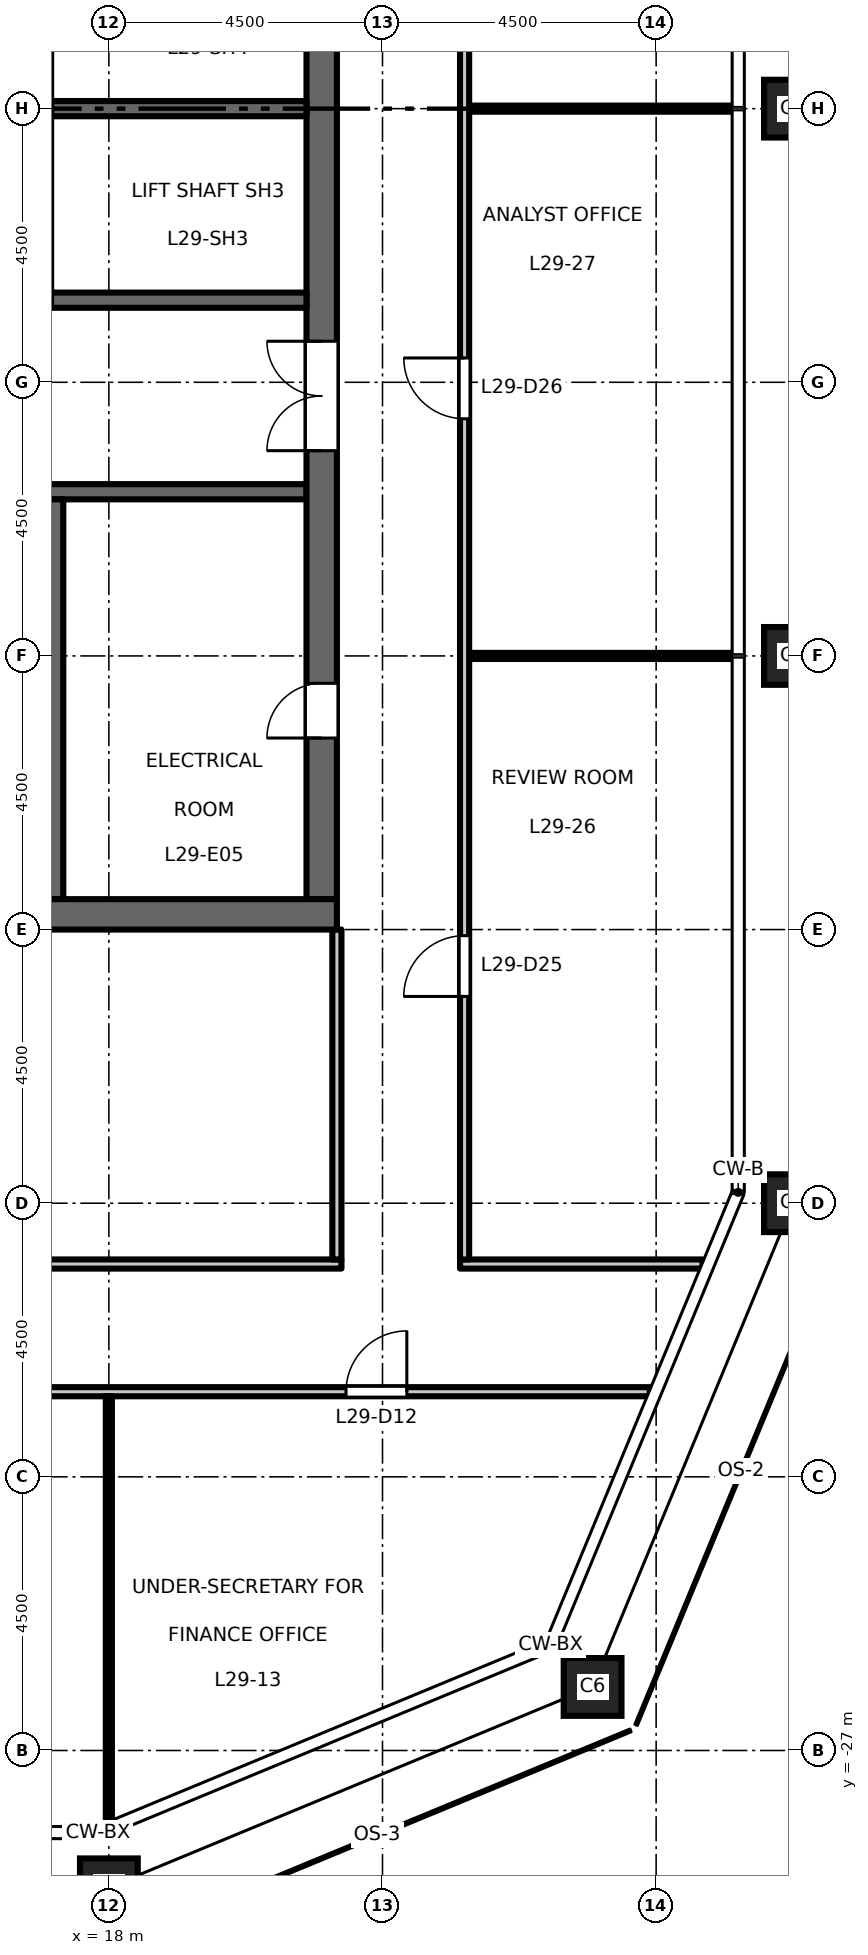
"""IFC4 building model, lengths in metres.
Left out: names, types, materials, properties, quantities, classifications, styles, units other than length and angle.
Written with IfcOpenShell. Run it as: python <this file> out.ifc"""

import sys

from ifc_helpers import new_model, si_unit, direction, frame, frame_2d, origin, origin_2d, place, context, subcontext, project, spatial, rectangle, hollow_rectangle, extrude, element, fill, save


model = new_model("IFC4")
c1 = context("Model", 3, precision=1e-05, world=origin(), true_north=direction((0.0, 1.0)))
c2 = subcontext(c1, "Body", "Model", "MODEL_VIEW")
j1 = project(units=[si_unit("LENGTHUNIT", "METRE"), si_unit("PLANEANGLEUNIT", "RADIAN")], contexts=[c1])
p1 = place(None, origin())
s1 = spatial("IfcSite", under=j1, at=p1, CompositionType="ELEMENT")
p2 = place(p1, origin())
s2 = spatial("IfcBuilding", under=s1, at=p2, CompositionType="ELEMENT")
p3 = place(p2, frame((0.0, 0.0, 136.2)))
s3 = spatial("IfcBuildingStorey", under=s2, at=p3, CompositionType="ELEMENT", Elevation=136.2)
for number, where, z_axis, x_axis in (
    (1, (18.0, -29.25, 0.0), (0.0, 0.0, 1.0), (1.0, 0.0, 0.0)),
    (2, (25.955, -25.955, 0.0), (0.0, 0.0, 1.0), (1.0, 0.0, 0.0)),
    (3, (29.25, -18.0, 0.0), (0.0, 0.0, 1.0), (1.0, 0.0, 0.0)),
    (4, (29.25, -9.0, 0.0), (0.0, 0.0, 1.0), (1.0, 0.0, 0.0)),
    (5, (29.25, 0.0, 0.0), (0.0, 0.0, 1.0), (1.0, 0.0, 0.0)),
):
    element("IfcColumn", number, at=place(p3, frame(where, z_axis=z_axis, x_axis=x_axis)), inside=s3, PredefinedType="COLUMN", context=c2, shape_type="SweptSolid", body=[
        extrude(hollow_rectangle(XDim=0.95, YDim=0.95, WallThickness=0.055, at=origin_2d()), origin(), (0.0, 0.0, 1.0), 4.5),
    ])
p4 = place(p3, frame((12.15, -6.3, 0.0), z_axis=(0.0, 0.0, 1.0), x_axis=(1.0, 0.0, 0.0)))
e6 = element("IfcWall", 6, at=p4, inside=s3, PredefinedType="SHEAR", context=c2, shape_type="SweptSolid", body=[
    extrude(rectangle(XDim=9.1, YDim=0.25, at=frame_2d((4.55, 0.0))), origin(), (0.0, 0.0, 1.0), 4.35),
])
p5 = place(p4, frame((1.8, 0.0, 0.0)))
e7 = element("IfcOpeningElement", 7, at=p5, cuts=e6, PredefinedType="OPENING", context=c2, shape_type="SweptSolid", body=[
    extrude(rectangle(XDim=1.0, YDim=2.1, at=frame_2d((0.5, 1.05))), frame((0.0, 0.135, 0.0), z_axis=(0.0, -1.0, 0.0), x_axis=(1.0, 0.0, 0.0)), (0.0, 0.0, 1.0), 0.27),
])
p6 = place(p3, frame((21.5, -13.0, 0.0), z_axis=(0.0, 0.0, 1.0), x_axis=(0.0, 1.0, 0.0)))
e8 = element("IfcWall", 8, at=p6, inside=s3, PredefinedType="SHEAR", context=c2, shape_type="SweptSolid", body=[
    extrude(rectangle(XDim=26.0, YDim=0.5, at=frame_2d((13.0, 0.0))), origin(), (0.0, 0.0, 1.0), 4.35),
])
p7 = place(p6, frame((16.825, 0.0, 0.0)))
e9 = element("IfcOpeningElement", 9, at=p7, cuts=e8, PredefinedType="OPENING", context=c2, shape_type="SweptSolid", body=[
    extrude(rectangle(XDim=1.8, YDim=2.1, at=frame_2d((0.9, 1.05))), frame((0.0, 0.26, 0.0), z_axis=(0.0, -1.0, 0.0), x_axis=(1.0, 0.0, 0.0)), (0.0, 0.0, 1.0), 0.52),
])
p8 = place(p6, frame((7.375, 0.0, 0.0)))
e10 = element("IfcOpeningElement", 10, at=p8, cuts=e8, PredefinedType="OPENING", context=c2, shape_type="SweptSolid", body=[
    extrude(rectangle(XDim=1.8, YDim=2.1, at=frame_2d((0.9, 1.05))), frame((0.0, 0.26, 0.0), z_axis=(0.0, -1.0, 0.0), x_axis=(1.0, 0.0, 0.0)), (0.0, 0.0, 1.0), 0.52),
])
p9 = place(p6, frame((2.65, 0.0, 0.0)))
e11 = element("IfcOpeningElement", 11, at=p9, cuts=e8, PredefinedType="OPENING", context=c2, shape_type="SweptSolid", body=[
    extrude(rectangle(XDim=0.9, YDim=2.1, at=frame_2d((0.45, 1.05))), frame((0.0, 0.26, 0.0), z_axis=(0.0, -1.0, 0.0), x_axis=(1.0, 0.0, 0.0)), (0.0, 0.0, 1.0), 0.52),
])
for number, where, z_axis, x_axis in (
    (12, (17.05, 0.0, 0.0), (0.0, 0.0, 1.0), (1.0, 0.0, 0.0)),
    (13, (17.05, -3.15, 0.0), (0.0, 0.0, 1.0), (1.0, 0.0, 0.0)),
):
    element("IfcWall", number, at=place(p3, frame(where, z_axis=z_axis, x_axis=x_axis)), inside=s3, PredefinedType="SHEAR", context=c2, shape_type="SweptSolid", body=[
        extrude(rectangle(XDim=4.2, YDim=0.25, at=frame_2d((2.1, 0.0))), origin(), (0.0, 0.0, 1.0), 4.35),
    ])
p10 = place(p3, frame((17.0, -13.0, 0.0), z_axis=(0.0, 0.0, 1.0), x_axis=(0.0, 1.0, 0.0)))
e14 = element("IfcWall", 14, at=p10, inside=s3, PredefinedType="SHEAR", context=c2, shape_type="SweptSolid", body=[
    extrude(rectangle(XDim=6.575, YDim=0.5, at=frame_2d((3.288, 0.0))), origin(), (0.0, 0.0, 1.0), 4.35),
])
p11 = place(p3, frame((8.25, -13.25, 0.0), z_axis=(0.0, 0.0, 1.0), x_axis=(1.0, 0.0, 0.0)))
e15 = element("IfcWall", 15, at=p11, inside=s3, PredefinedType="SHEAR", context=c2, shape_type="SweptSolid", body=[
    extrude(rectangle(XDim=13.5, YDim=0.5, at=frame_2d((6.75, 0.0))), origin(), (0.0, 0.0, 1.0), 4.35),
])
p12 = place(p3, frame((-26.894, -21.1, 0.0), z_axis=(0.0, 0.0, 1.0), x_axis=(1.0, 0.0, 0.0)))
e16 = element("IfcWall", 16, at=p12, inside=s3, PredefinedType="PARTITIONING", context=c2, shape_type="SweptSolid", body=[
    extrude(rectangle(XDim=53.788, YDim=0.15, at=frame_2d((26.894, 0.0))), origin(), (0.0, 0.0, 1.0), 4.35),
])
p13 = place(p12, frame((12.794, 0.0, 0.0)))
e17 = element("IfcOpeningElement", 17, at=p13, cuts=e16, PredefinedType="OPENING", context=c2, shape_type="SweptSolid", body=[
    extrude(rectangle(XDim=1.0, YDim=2.1, at=frame_2d((0.5, 1.05))), frame((0.0, 0.085, 0.0), z_axis=(0.0, -1.0, 0.0), x_axis=(1.0, 0.0, 0.0)), (0.0, 0.0, 1.0), 0.17),
])
p14 = place(p12, frame((21.794, 0.0, 0.0)))
e18 = element("IfcOpeningElement", 18, at=p14, cuts=e16, PredefinedType="OPENING", context=c2, shape_type="SweptSolid", body=[
    extrude(rectangle(XDim=1.0, YDim=2.1, at=frame_2d((0.5, 1.05))), frame((0.0, 0.085, 0.0), z_axis=(0.0, -1.0, 0.0), x_axis=(1.0, 0.0, 0.0)), (0.0, 0.0, 1.0), 0.17),
])
p15 = place(p12, frame((30.794, 0.0, 0.0)))
e19 = element("IfcOpeningElement", 19, at=p15, cuts=e16, PredefinedType="OPENING", context=c2, shape_type="SweptSolid", body=[
    extrude(rectangle(XDim=1.0, YDim=2.1, at=frame_2d((0.5, 1.05))), frame((0.0, 0.085, 0.0), z_axis=(0.0, -1.0, 0.0), x_axis=(1.0, 0.0, 0.0)), (0.0, 0.0, 1.0), 0.17),
])
p16 = place(p12, frame((39.794, 0.0, 0.0)))
e20 = element("IfcOpeningElement", 20, at=p16, cuts=e16, PredefinedType="OPENING", context=c2, shape_type="SweptSolid", body=[
    extrude(rectangle(XDim=1.0, YDim=2.1, at=frame_2d((0.5, 1.05))), frame((0.0, 0.085, 0.0), z_axis=(0.0, -1.0, 0.0), x_axis=(1.0, 0.0, 0.0)), (0.0, 0.0, 1.0), 0.17),
])
p17 = place(p12, frame((3.9, 0.0, 0.0)))
e21 = element("IfcOpeningElement", 21, at=p17, cuts=e16, PredefinedType="OPENING", context=c2, shape_type="SweptSolid", body=[
    extrude(rectangle(XDim=1.0, YDim=2.1, at=frame_2d((0.5, 1.05))), frame((0.0, 0.085, 0.0), z_axis=(0.0, -1.0, 0.0), x_axis=(1.0, 0.0, 0.0)), (0.0, 0.0, 1.0), 0.17),
])
p18 = place(p12, frame((48.794, 0.0, 0.0)))
e22 = element("IfcOpeningElement", 22, at=p18, cuts=e16, PredefinedType="OPENING", context=c2, shape_type="SweptSolid", body=[
    extrude(rectangle(XDim=1.0, YDim=2.1, at=frame_2d((0.5, 1.05))), frame((0.0, 0.085, 0.0), z_axis=(0.0, -1.0, 0.0), x_axis=(1.0, 0.0, 0.0)), (0.0, 0.0, 1.0), 0.17),
])
p19 = place(p3, frame((-21.825, -19.0, 0.0), z_axis=(0.0, 0.0, 1.0), x_axis=(1.0, 0.0, 0.0)))
e23 = element("IfcWall", 23, at=p19, inside=s3, PredefinedType="PARTITIONING", context=c2, shape_type="SweptSolid", body=[
    extrude(rectangle(XDim=43.65, YDim=0.15, at=frame_2d((21.825, 0.0))), origin(), (0.0, 0.0, 1.0), 4.35),
])
p20 = place(p19, frame((21.425, 0.0, 0.0)))
e24 = element("IfcOpeningElement", 24, at=p20, cuts=e23, PredefinedType="OPENING", context=c2, shape_type="SweptSolid", body=[
    extrude(rectangle(XDim=1.0, YDim=2.1, at=frame_2d((0.5, 1.05))), frame((0.0, 0.085, 0.0), z_axis=(0.0, -1.0, 0.0), x_axis=(1.0, 0.0, 0.0)), (0.0, 0.0, 1.0), 0.17),
])
p21 = place(p19, frame((6.425, 0.0, 0.0)))
e25 = element("IfcOpeningElement", 25, at=p21, cuts=e23, PredefinedType="OPENING", context=c2, shape_type="SweptSolid", body=[
    extrude(rectangle(XDim=1.0, YDim=2.1, at=frame_2d((0.5, 1.05))), frame((0.0, 0.085, 0.0), z_axis=(0.0, -1.0, 0.0), x_axis=(1.0, 0.0, 0.0)), (0.0, 0.0, 1.0), 0.17),
])
p22 = place(p19, frame((36.425, 0.0, 0.0)))
e26 = element("IfcOpeningElement", 26, at=p22, cuts=e23, PredefinedType="OPENING", context=c2, shape_type="SweptSolid", body=[
    extrude(rectangle(XDim=1.0, YDim=2.1, at=frame_2d((0.5, 1.05))), frame((0.0, 0.085, 0.0), z_axis=(0.0, -1.0, 0.0), x_axis=(1.0, 0.0, 0.0)), (0.0, 0.0, 1.0), 0.17),
])
p23 = place(p3, frame((23.775, -19.0, 0.0), z_axis=(0.0, 0.0, 1.0), x_axis=(1.0, 0.0, 0.0)))
e27 = element("IfcWall", 27, at=p23, inside=s3, PredefinedType="PARTITIONING", context=c2, shape_type="SweptSolid", body=[
    extrude(rectangle(XDim=3.989, YDim=0.15, at=frame_2d((1.995, 0.0))), origin(), (0.0, 0.0, 1.0), 4.35),
])
for number, where, z_axis, x_axis in (
    (28, (23.925, -9.0, 0.0), (0.0, 0.0, 1.0), (1.0, 0.0, 0.0)),
    (29, (23.925, 0.0, 0.0), (0.0, 0.0, 1.0), (1.0, 0.0, 0.0)),
):
    element("IfcWall", number, at=place(p3, frame(where, z_axis=z_axis, x_axis=x_axis)), inside=s3, PredefinedType="PARTITIONING", context=c2, shape_type="SweptSolid", body=[
        extrude(rectangle(XDim=4.335, YDim=0.1, at=frame_2d((2.167, 0.0))), origin(), (0.0, 0.0, 1.0), 4.35),
    ])
p24 = place(p3, frame((18.0, -28.178, 0.0), z_axis=(0.0, 0.0, 1.0), x_axis=(0.0, 1.0, 0.0)))
e30 = element("IfcWall", 30, at=p24, inside=s3, PredefinedType="PARTITIONING", context=c2, shape_type="SweptSolid", body=[
    extrude(rectangle(XDim=7.003, YDim=0.1, at=frame_2d((3.501, 0.0))), origin(), (0.0, 0.0, 1.0), 3.45),
])
p25 = place(p3, frame((21.75, -18.925, 0.0), z_axis=(0.0, 0.0, 1.0), x_axis=(0.0, 1.0, 0.0)))
e31 = element("IfcWall", 31, at=p25, inside=s3, PredefinedType="PARTITIONING", context=c2, shape_type="SweptSolid", body=[
    extrude(rectangle(XDim=5.425, YDim=0.15, at=frame_2d((2.712, 0.0))), origin(), (0.0, 0.0, 1.0), 4.35),
])
p26 = place(p3, frame((23.85, -18.925, 0.0), z_axis=(0.0, 0.0, 1.0), x_axis=(0.0, 1.0, 0.0)))
e32 = element("IfcWall", 32, at=p26, inside=s3, PredefinedType="PARTITIONING", context=c2, shape_type="SweptSolid", body=[
    extrude(rectangle(XDim=37.85, YDim=0.15, at=frame_2d((18.925, 0.0))), origin(), (0.0, 0.0, 1.0), 4.35),
])
p27 = place(p26, frame((4.325, 0.0, 0.0)))
e33 = element("IfcOpeningElement", 33, at=p27, cuts=e32, PredefinedType="OPENING", context=c2, shape_type="SweptSolid", body=[
    extrude(rectangle(XDim=1.0, YDim=2.1, at=frame_2d((0.5, 1.05))), frame((0.0, 0.085, 0.0), z_axis=(0.0, -1.0, 0.0), x_axis=(1.0, 0.0, 0.0)), (0.0, 0.0, 1.0), 0.17),
])
p28 = place(p26, frame((13.825, 0.0, 0.0)))
e34 = element("IfcOpeningElement", 34, at=p28, cuts=e32, PredefinedType="OPENING", context=c2, shape_type="SweptSolid", body=[
    extrude(rectangle(XDim=1.0, YDim=2.1, at=frame_2d((0.5, 1.05))), frame((0.0, 0.085, 0.0), z_axis=(0.0, -1.0, 0.0), x_axis=(1.0, 0.0, 0.0)), (0.0, 0.0, 1.0), 0.17),
])
p29 = place(p26, frame((22.825, 0.0, 0.0)))
e35 = element("IfcOpeningElement", 35, at=p29, cuts=e32, PredefinedType="OPENING", context=c2, shape_type="SweptSolid", body=[
    extrude(rectangle(XDim=1.0, YDim=2.1, at=frame_2d((0.5, 1.05))), frame((0.0, 0.085, 0.0), z_axis=(0.0, -1.0, 0.0), x_axis=(1.0, 0.0, 0.0)), (0.0, 0.0, 1.0), 0.17),
])
p30 = place(p26, frame((32.325, 0.0, 0.0)))
e36 = element("IfcOpeningElement", 36, at=p30, cuts=e32, PredefinedType="OPENING", context=c2, shape_type="SweptSolid", body=[
    extrude(rectangle(XDim=1.0, YDim=2.1, at=frame_2d((0.5, 1.05))), frame((0.0, 0.085, 0.0), z_axis=(0.0, -1.0, 0.0), x_axis=(1.0, 0.0, 0.0)), (0.0, 0.0, 1.0), 0.17),
])
p31 = place(p8, origin())
e37 = element("IfcDoor", 37, at=p31, inside=s3, OperationType="DOUBLE_DOOR_DOUBLE_SWING", PredefinedType="DOOR", context=c2, shape_type="SweptSolid", body=[
    extrude(rectangle(XDim=1.8, YDim=2.1, at=frame_2d((0.9, 1.05))), frame((0.0, 0.025, 0.0), z_axis=(0.0, -1.0, 0.0), x_axis=(1.0, 0.0, 0.0)), (0.0, 0.0, 1.0), 0.05),
])
fill(e10, e37)
p32 = place(p9, origin())
e38 = element("IfcDoor", 38, at=p32, inside=s3, OperationType="SINGLE_SWING_RIGHT", PredefinedType="DOOR", context=c2, shape_type="SweptSolid", body=[
    extrude(rectangle(XDim=0.9, YDim=2.1, at=frame_2d((0.45, 1.05))), frame((0.0, 0.025, 0.0), z_axis=(0.0, -1.0, 0.0), x_axis=(1.0, 0.0, 0.0)), (0.0, 0.0, 1.0), 0.05),
])
fill(e11, e38)
p33 = place(p18, origin())
e39 = element("IfcDoor", 39, at=p33, inside=s3, OperationType="SINGLE_SWING_RIGHT", PredefinedType="DOOR", context=c2, shape_type="SweptSolid", body=[
    extrude(rectangle(XDim=1.0, YDim=2.1, at=frame_2d((0.5, 1.05))), frame((0.0, 0.025, 0.0), z_axis=(0.0, -1.0, 0.0), x_axis=(1.0, 0.0, 0.0)), (0.0, 0.0, 1.0), 0.05),
])
fill(e22, e39)
p34 = place(p27, origin())
e40 = element("IfcDoor", 40, at=p34, inside=s3, OperationType="SINGLE_SWING_LEFT", PredefinedType="DOOR", context=c2, shape_type="SweptSolid", body=[
    extrude(rectangle(XDim=1.0, YDim=2.1, at=frame_2d((0.5, 1.05))), frame((0.0, 0.025, 0.0), z_axis=(0.0, -1.0, 0.0), x_axis=(1.0, 0.0, 0.0)), (0.0, 0.0, 1.0), 0.05),
])
fill(e33, e40)
p35 = place(p28, origin())
e41 = element("IfcDoor", 41, at=p35, inside=s3, OperationType="SINGLE_SWING_RIGHT", PredefinedType="DOOR", context=c2, shape_type="SweptSolid", body=[
    extrude(rectangle(XDim=1.0, YDim=2.1, at=frame_2d((0.5, 1.05))), frame((0.0, 0.025, 0.0), z_axis=(0.0, -1.0, 0.0), x_axis=(1.0, 0.0, 0.0)), (0.0, 0.0, 1.0), 0.05),
])
fill(e34, e41)
save(model, sys.argv[1])
